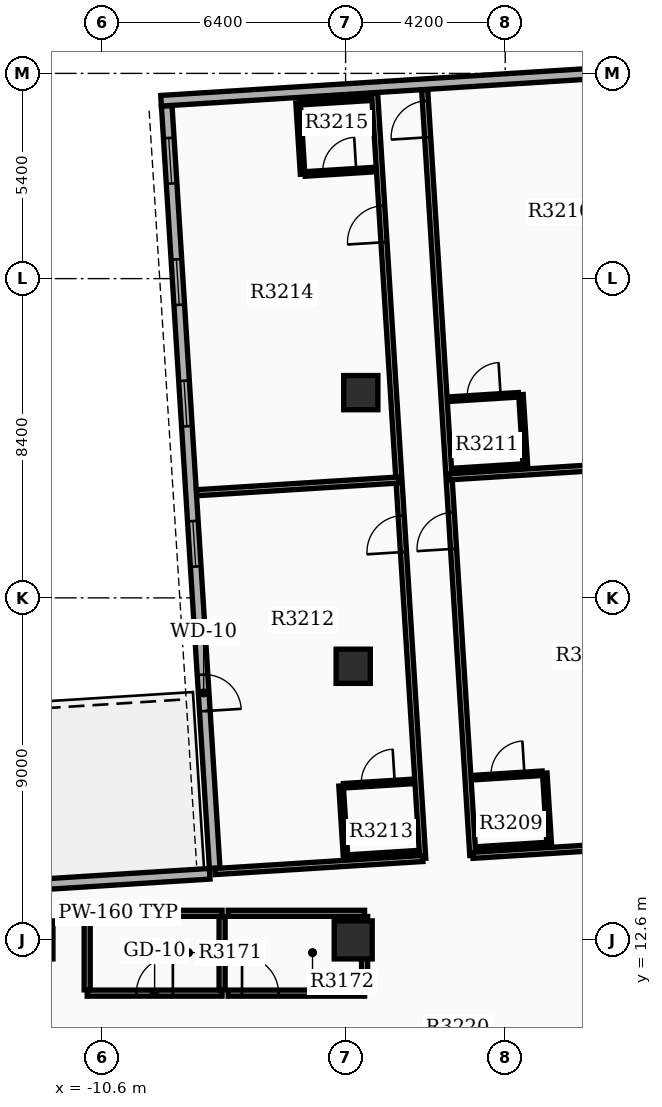
"""IFC4 building model, lengths in metres.
Left out: names, types, materials, properties, quantities, classifications, styles, units other than length and angle.
Written with IfcOpenShell. Run it as: python <this file> out.ifc"""

import sys

from ifc_helpers import new_model, si_unit, direction, frame, frame_2d, origin, origin_2d, place, context, subcontext, project, spatial, rectangle, extrude, element, fill, save


model = new_model("IFC4")
c1 = context("Model", 3, precision=1e-05, world=origin(), true_north=direction((0.0, 1.0)))
c2 = subcontext(c1, "Body", "Model", "MODEL_VIEW")
j1 = project(units=[si_unit("LENGTHUNIT", "METRE"), si_unit("PLANEANGLEUNIT", "RADIAN")], contexts=[c1])
p1 = place(None, origin())
s1 = spatial("IfcSite", under=j1, at=p1, CompositionType="ELEMENT")
p2 = place(p1, origin())
s2 = spatial("IfcBuilding", under=s1, at=p2, CompositionType="ELEMENT")
p3 = place(p2, frame((0.0, 0.0, 201.3)))
s3 = spatial("IfcBuildingStorey", under=s2, at=p3, CompositionType="ELEMENT", Elevation=201.3)
for number, where, z_axis, x_axis in (
    (1, (-12.4, 12.6, 0.0), (0.0, 0.0, 1.0), (1.0, 0.0, 0.0)),
    (2, (-4.0, 12.6, 0.0), (0.0, 0.0, 1.0), (1.0, 0.0, 0.0)),
):
    element("IfcColumn", number, at=place(p3, frame(where, z_axis=z_axis, x_axis=x_axis)), inside=s3, PredefinedType="COLUMN", context=c2, shape_type="SweptSolid", body=[
        extrude(rectangle(XDim=1.0, YDim=1.0, at=origin_2d()), origin(), (0.0, 0.0, 1.0), 3.9),
    ])
for number, where, z_axis, x_axis in (
    (3, (-4.0, 19.8, 0.0), (0.0, 0.0, 1.0), (1.0, 0.0, 0.0)),
    (4, (-3.8, 27.0, 0.0), (0.0, 0.0, 1.0), (1.0, 0.0, 0.0)),
):
    element("IfcColumn", number, at=place(p3, frame(where, z_axis=z_axis, x_axis=x_axis)), inside=s3, PredefinedType="COLUMN", context=c2, shape_type="SweptSolid", body=[
        extrude(rectangle(XDim=0.9, YDim=0.9, at=origin_2d()), origin(), (0.0, 0.0, 1.0), 3.9),
    ])
p4 = place(p3, frame((-8.907, 34.549, 0.0), z_axis=(0.0, 0.0, 1.0), x_axis=(0.06279645424, -0.99802635503, 0.0)))
e5 = element("IfcWall", 5, at=p4, inside=s3, PredefinedType="STANDARD", context=c2, shape_type="SweptSolid", body=[
    extrude(rectangle(XDim=20.1, YDim=0.28, at=frame_2d((10.05, 0.0))), origin(), (0.0, 0.0, 1.0), 3.18),
])
p5 = place(p4, frame((0.85, 0.0, 0.8)))
e6 = element("IfcOpeningElement", 6, at=p5, cuts=e5, PredefinedType="OPENING", context=c2, shape_type="SweptSolid", body=[
    extrude(rectangle(XDim=1.2, YDim=1.6, at=frame_2d((0.6, 0.8))), frame((0.0, 0.15, 0.0), z_axis=(0.0, -1.0, 0.0), x_axis=(1.0, 0.0, 0.0)), (0.0, 0.0, 1.0), 0.3),
])
p6 = place(p4, frame((4.05, 0.0, 0.8)))
e7 = element("IfcOpeningElement", 7, at=p6, cuts=e5, PredefinedType="OPENING", context=c2, shape_type="SweptSolid", body=[
    extrude(rectangle(XDim=1.2, YDim=1.6, at=frame_2d((0.6, 0.8))), frame((0.0, 0.15, 0.0), z_axis=(0.0, -1.0, 0.0), x_axis=(1.0, 0.0, 0.0)), (0.0, 0.0, 1.0), 0.3),
])
p7 = place(p4, frame((7.25, 0.0, 0.8)))
e8 = element("IfcOpeningElement", 8, at=p7, cuts=e5, PredefinedType="OPENING", context=c2, shape_type="SweptSolid", body=[
    extrude(rectangle(XDim=1.2, YDim=1.6, at=frame_2d((0.6, 0.8))), frame((0.0, 0.15, 0.0), z_axis=(0.0, -1.0, 0.0), x_axis=(1.0, 0.0, 0.0)), (0.0, 0.0, 1.0), 0.3),
])
p8 = place(p4, frame((10.95, 0.0, 0.8)))
e9 = element("IfcOpeningElement", 9, at=p8, cuts=e5, PredefinedType="OPENING", context=c2, shape_type="SweptSolid", body=[
    extrude(rectangle(XDim=1.2, YDim=1.6, at=frame_2d((0.6, 0.8))), frame((0.0, 0.15, 0.0), z_axis=(0.0, -1.0, 0.0), x_axis=(1.0, 0.0, 0.0)), (0.0, 0.0, 1.0), 0.3),
])
p9 = place(p4, frame((15.0, 0.0, 0.0)))
e10 = element("IfcOpeningElement", 10, at=p9, cuts=e5, PredefinedType="OPENING", context=c2, shape_type="SweptSolid", body=[
    extrude(rectangle(XDim=0.96, YDim=2.1, at=frame_2d((0.48, 1.05))), frame((0.0, 0.15, 0.0), z_axis=(0.0, -1.0, 0.0), x_axis=(1.0, 0.0, 0.0)), (0.0, 0.0, 1.0), 0.3),
])
p10 = place(p3, frame((4.637, 35.541, 0.0), z_axis=(0.0, 0.0, 1.0), x_axis=(-0.998026318072, -0.062797041623, 0.0)))
e11 = element("IfcWall", 11, at=p10, inside=s3, PredefinedType="STANDARD", context=c2, shape_type="SweptSolid", body=[
    extrude(rectangle(XDim=13.72, YDim=0.28, at=frame_2d((6.86, 0.0))), origin(), (0.0, 0.0, 1.0), 3.18),
])
p11 = place(p10, frame((0.85, 0.0, 0.85)))
e12 = element("IfcOpeningElement", 12, at=p11, cuts=e11, PredefinedType="OPENING", context=c2, shape_type="SweptSolid", body=[
    extrude(rectangle(XDim=1.0, YDim=1.5, at=frame_2d((0.5, 0.75))), frame((0.0, 0.15, 0.0), z_axis=(0.0, -1.0, 0.0), x_axis=(1.0, 0.0, 0.0)), (0.0, 0.0, 1.0), 0.3),
])
p12 = place(p3, frame((-14.063, 13.945, 0.0), z_axis=(0.0, 0.0, 1.0), x_axis=(0.998027314704, 0.062781200242, 0.0)))
e13 = element("IfcWall", 13, at=p12, inside=s3, PredefinedType="STANDARD", context=c2, shape_type="SweptSolid", body=[
    extrude(rectangle(XDim=6.3, YDim=0.28, at=frame_2d((3.15, 0.0))), origin(), (0.0, 0.0, 1.0), 3.18),
])
p13 = place(p3, frame((-11.0, 11.2, 0.0), z_axis=(0.0, 0.0, 1.0), x_axis=(1.0, 0.0, 0.0)))
e14 = element("IfcWall", 14, at=p13, inside=s3, PredefinedType="PARTITIONING", context=c2, shape_type="SweptSolid", body=[
    extrude(rectangle(XDim=3.55, YDim=0.16, at=frame_2d((1.775, 0.0))), origin(), (0.0, 0.0, 1.0), 3.17),
])
p14 = place(p13, frame((1.295, 0.0, 0.0)))
e15 = element("IfcOpeningElement", 15, at=p14, cuts=e14, PredefinedType="OPENING", context=c2, shape_type="SweptSolid", body=[
    extrude(rectangle(XDim=0.96, YDim=2.15, at=frame_2d((0.48, 1.075))), frame((0.0, 0.09, 0.0), z_axis=(0.0, -1.0, 0.0), x_axis=(1.0, 0.0, 0.0)), (0.0, 0.0, 1.0), 0.18),
])
p15 = place(p3, frame((-11.0, 13.3, 0.0), z_axis=(0.0, 0.0, 1.0), x_axis=(1.0, 0.0, 0.0)))
e16 = element("IfcWall", 16, at=p15, inside=s3, PredefinedType="PARTITIONING", context=c2, shape_type="SweptSolid", body=[
    extrude(rectangle(XDim=3.55, YDim=0.16, at=frame_2d((1.775, 0.0))), origin(), (0.0, 0.0, 1.0), 3.17),
])
for number, where, z_axis, x_axis in (
    (17, (-11.0, 11.285, 0.0), (0.0, 0.0, 1.0), (0.0, 1.0, 0.0)),
    (18, (-7.45, 11.285, 0.0), (0.0, 0.0, 1.0), (0.0, 1.0, 0.0)),
):
    element("IfcWall", number, at=place(p3, frame(where, z_axis=z_axis, x_axis=x_axis)), inside=s3, PredefinedType="PARTITIONING", context=c2, shape_type="SweptSolid", body=[
        extrude(rectangle(XDim=1.93, YDim=0.16, at=frame_2d((0.965, 0.0))), origin(), (0.0, 0.0, 1.0), 3.17),
    ])
p16 = place(p3, frame((-7.29, 11.2, 0.0), z_axis=(0.0, 0.0, 1.0), x_axis=(1.0, 0.0, 0.0)))
e19 = element("IfcWall", 19, at=p16, inside=s3, PredefinedType="PARTITIONING", context=c2, shape_type="SweptSolid", body=[
    extrude(rectangle(XDim=3.59, YDim=0.16, at=frame_2d((1.795, 0.0))), origin(), (0.0, 0.0, 1.0), 3.17),
])
p17 = place(p16, frame((0.365, 0.0, 0.0)))
e20 = element("IfcOpeningElement", 20, at=p17, cuts=e19, PredefinedType="OPENING", context=c2, shape_type="SweptSolid", body=[
    extrude(rectangle(XDim=0.96, YDim=2.15, at=frame_2d((0.48, 1.075))), frame((0.0, 0.09, 0.0), z_axis=(0.0, -1.0, 0.0), x_axis=(1.0, 0.0, 0.0)), (0.0, 0.0, 1.0), 0.18),
])
p18 = place(p3, frame((-7.29, 13.3, 0.0), z_axis=(0.0, 0.0, 1.0), x_axis=(1.0, 0.0, 0.0)))
e21 = element("IfcWall", 21, at=p18, inside=s3, PredefinedType="PARTITIONING", context=c2, shape_type="SweptSolid", body=[
    extrude(rectangle(XDim=3.59, YDim=0.16, at=frame_2d((1.795, 0.0))), origin(), (0.0, 0.0, 1.0), 3.17),
])
p19 = place(p3, frame((-3.7, 11.285, 0.0), z_axis=(0.0, 0.0, 1.0), x_axis=(0.0, 1.0, 0.0)))
e22 = element("IfcWall", 22, at=p19, inside=s3, PredefinedType="PARTITIONING", context=c2, shape_type="SweptSolid", body=[
    extrude(rectangle(XDim=1.93, YDim=0.16, at=frame_2d((0.965, 0.0))), origin(), (0.0, 0.0, 1.0), 3.17),
])
p20 = place(p3, frame((-0.853, 14.826, 0.0), z_axis=(0.0, 0.0, 1.0), x_axis=(-0.062794751284, 0.99802646218, 0.0)))
e23 = element("IfcWall", 23, at=p20, inside=s3, PredefinedType="PARTITIONING", context=c2, shape_type="SweptSolid", body=[
    extrude(rectangle(XDim=20.182, YDim=0.16, at=frame_2d((10.091, 0.0))), origin(), (0.0, 0.0, 1.0), 3.17),
])
p21 = place(p20, frame((8.08, 0.0, 0.0)))
e24 = element("IfcOpeningElement", 24, at=p21, cuts=e23, PredefinedType="OPENING", context=c2, shape_type="SweptSolid", body=[
    extrude(rectangle(XDim=0.96, YDim=2.15, at=frame_2d((0.48, 1.075))), frame((0.0, 0.09, 0.0), z_axis=(0.0, -1.0, 0.0), x_axis=(1.0, 0.0, 0.0)), (0.0, 0.0, 1.0), 0.18),
])
p22 = place(p20, frame((18.93, 0.0, 0.0)))
e25 = element("IfcOpeningElement", 25, at=p22, cuts=e23, PredefinedType="OPENING", context=c2, shape_type="SweptSolid", body=[
    extrude(rectangle(XDim=0.96, YDim=2.15, at=frame_2d((0.48, 1.075))), frame((0.0, 0.09, 0.0), z_axis=(0.0, -1.0, 0.0), x_axis=(1.0, 0.0, 0.0)), (0.0, 0.0, 1.0), 0.18),
])
p23 = place(p3, frame((-0.853, 14.826, 0.0), z_axis=(0.0, 0.0, 1.0), x_axis=(0.998026165557, 0.062799465472, 0.0)))
e26 = element("IfcWall", 26, at=p23, inside=s3, PredefinedType="PARTITIONING", context=c2, shape_type="SweptSolid", body=[
    extrude(rectangle(XDim=6.64, YDim=0.16, at=frame_2d((3.32, 0.0))), origin(), (0.0, 0.0, 1.0), 3.17),
])
p24 = place(p3, frame((-1.479, 24.784, 0.0), z_axis=(0.0, 0.0, 1.0), x_axis=(0.998025855021, 0.062804400403, 0.0)))
e27 = element("IfcWall", 27, at=p24, inside=s3, PredefinedType="PARTITIONING", context=c2, shape_type="SweptSolid", body=[
    extrude(rectangle(XDim=6.492, YDim=0.16, at=frame_2d((3.246, 0.0))), origin(), (0.0, 0.0, 1.0), 3.17),
])
p25 = place(p3, frame((-0.841, 16.871, 0.0), z_axis=(0.0, 0.0, 1.0), x_axis=(0.998027443946, 0.062779145668, 0.0)))
e28 = element("IfcWall", 28, at=p25, inside=s3, PredefinedType="PARTITIONING", context=c2, shape_type="SweptSolid", body=[
    extrude(rectangle(XDim=1.82, YDim=0.12, at=frame_2d((0.91, 0.0))), origin(), (0.0, 0.0, 1.0), 3.17),
])
p26 = place(p25, frame((0.47, 0.0, 0.0)))
e29 = element("IfcOpeningElement", 29, at=p26, cuts=e28, PredefinedType="OPENING", context=c2, shape_type="SweptSolid", body=[
    extrude(rectangle(XDim=0.88, YDim=2.1, at=frame_2d((0.44, 1.05))), frame((0.0, 0.07, 0.0), z_axis=(0.0, -1.0, 0.0), x_axis=(1.0, 0.0, 0.0)), (0.0, 0.0, 1.0), 0.14),
])
p27 = place(p3, frame((-0.723, 14.994, 0.0), z_axis=(0.0, 0.0, 1.0), x_axis=(0.998027443946, 0.062779145668, 0.0)))
e30 = element("IfcWall", 30, at=p27, inside=s3, PredefinedType="PARTITIONING", context=c2, shape_type="SweptSolid", body=[
    extrude(rectangle(XDim=1.82, YDim=0.12, at=frame_2d((0.91, 0.0))), origin(), (0.0, 0.0, 1.0), 3.17),
])
p28 = place(p3, frame((1.158, 15.113, 0.0), z_axis=(0.0, 0.0, 1.0), x_axis=(-0.062855297722, 0.998022650819, 0.0)))
e31 = element("IfcWall", 31, at=p28, inside=s3, PredefinedType="PARTITIONING", context=c2, shape_type="SweptSolid", body=[
    extrude(rectangle(XDim=1.88, YDim=0.12, at=frame_2d((0.94, 0.0))), origin(), (0.0, 0.0, 1.0), 3.17),
])
p29 = place(p3, frame((-1.468, 26.829, 0.0), z_axis=(0.0, 0.0, 1.0), x_axis=(0.998027443946, 0.062779145668, 0.0)))
e32 = element("IfcWall", 32, at=p29, inside=s3, PredefinedType="PARTITIONING", context=c2, shape_type="SweptSolid", body=[
    extrude(rectangle(XDim=1.82, YDim=0.12, at=frame_2d((0.91, 0.0))), origin(), (0.0, 0.0, 1.0), 3.17),
])
p30 = place(p29, frame((0.47, 0.0, 0.0)))
e33 = element("IfcOpeningElement", 33, at=p30, cuts=e32, PredefinedType="OPENING", context=c2, shape_type="SweptSolid", body=[
    extrude(rectangle(XDim=0.88, YDim=2.1, at=frame_2d((0.44, 1.05))), frame((0.0, 0.07, 0.0), z_axis=(0.0, -1.0, 0.0), x_axis=(1.0, 0.0, 0.0)), (0.0, 0.0, 1.0), 0.14),
])
p31 = place(p3, frame((-1.349, 24.952, 0.0), z_axis=(0.0, 0.0, 1.0), x_axis=(0.998019030272, 0.062912758763, 0.0)))
e34 = element("IfcWall", 34, at=p31, inside=s3, PredefinedType="PARTITIONING", context=c2, shape_type="SweptSolid", body=[
    extrude(rectangle(XDim=1.82, YDim=0.12, at=frame_2d((0.91, 0.0))), origin(), (0.0, 0.0, 1.0), 3.17),
])
p32 = place(p3, frame((0.532, 25.071, 0.0), z_axis=(0.0, 0.0, 1.0), x_axis=(-0.062717813936, 0.998031300018, 0.0)))
e35 = element("IfcWall", 35, at=p32, inside=s3, PredefinedType="PARTITIONING", context=c2, shape_type="SweptSolid", body=[
    extrude(rectangle(XDim=1.88, YDim=0.12, at=frame_2d((0.94, 0.0))), origin(), (0.0, 0.0, 1.0), 3.17),
])
p33 = place(p3, frame((-2.17, 14.743, 0.0), z_axis=(0.0, 0.0, 1.0), x_axis=(-0.062795509413, 0.998026414479, 0.0)))
e36 = element("IfcWall", 36, at=p33, inside=s3, PredefinedType="PARTITIONING", context=c2, shape_type="SweptSolid", body=[
    extrude(rectangle(XDim=20.182, YDim=0.16, at=frame_2d((10.091, 0.0))), origin(), (0.0, 0.0, 1.0), 3.17),
])
p34 = place(p33, frame((8.08, 0.0, 0.0)))
e37 = element("IfcOpeningElement", 37, at=p34, cuts=e36, PredefinedType="OPENING", context=c2, shape_type="SweptSolid", body=[
    extrude(rectangle(XDim=0.96, YDim=2.15, at=frame_2d((0.48, 1.075))), frame((0.0, 0.09, 0.0), z_axis=(0.0, -1.0, 0.0), x_axis=(1.0, 0.0, 0.0)), (0.0, 0.0, 1.0), 0.18),
])
p35 = place(p33, frame((16.247, 0.0, 0.0)))
e38 = element("IfcOpeningElement", 38, at=p35, cuts=e36, PredefinedType="OPENING", context=c2, shape_type="SweptSolid", body=[
    extrude(rectangle(XDim=0.96, YDim=2.15, at=frame_2d((0.48, 1.075))), frame((0.0, 0.09, 0.0), z_axis=(0.0, -1.0, 0.0), x_axis=(1.0, 0.0, 0.0)), (0.0, 0.0, 1.0), 0.18),
])
p36 = place(p3, frame((-2.17, 14.743, 0.0), z_axis=(0.0, 0.0, 1.0), x_axis=(-0.998025093119, -0.06281650662, 0.0)))
e39 = element("IfcWall", 39, at=p36, inside=s3, PredefinedType="PARTITIONING", context=c2, shape_type="SweptSolid", body=[
    extrude(rectangle(XDim=5.48, YDim=0.16, at=frame_2d((2.74, 0.0))), origin(), (0.0, 0.0, 1.0), 3.17),
])
p37 = place(p3, frame((-2.796, 24.701, 0.0), z_axis=(0.0, 0.0, 1.0), x_axis=(-0.998027735445, -0.062774511414, 0.0)))
e40 = element("IfcWall", 40, at=p37, inside=s3, PredefinedType="PARTITIONING", context=c2, shape_type="SweptSolid", body=[
    extrude(rectangle(XDim=5.332, YDim=0.16, at=frame_2d((2.666, 0.0))), origin(), (0.0, 0.0, 1.0), 3.17),
])
p38 = place(p3, frame((-4.254, 16.656, 0.0), z_axis=(0.0, 0.0, 1.0), x_axis=(0.998027443946, 0.062779145668, 0.0)))
e41 = element("IfcWall", 41, at=p38, inside=s3, PredefinedType="PARTITIONING", context=c2, shape_type="SweptSolid", body=[
    extrude(rectangle(XDim=1.82, YDim=0.12, at=frame_2d((0.91, 0.0))), origin(), (0.0, 0.0, 1.0), 3.17),
])
p39 = place(p38, frame((0.47, 0.0, 0.0)))
e42 = element("IfcOpeningElement", 42, at=p39, cuts=e41, PredefinedType="OPENING", context=c2, shape_type="SweptSolid", body=[
    extrude(rectangle(XDim=0.88, YDim=2.1, at=frame_2d((0.44, 1.05))), frame((0.0, 0.07, 0.0), z_axis=(0.0, -1.0, 0.0), x_axis=(1.0, 0.0, 0.0)), (0.0, 0.0, 1.0), 0.14),
])
p40 = place(p3, frame((-4.136, 14.78, 0.0), z_axis=(0.0, 0.0, 1.0), x_axis=(0.998027443946, 0.062779145668, 0.0)))
e43 = element("IfcWall", 43, at=p40, inside=s3, PredefinedType="PARTITIONING", context=c2, shape_type="SweptSolid", body=[
    extrude(rectangle(XDim=1.82, YDim=0.12, at=frame_2d((0.91, 0.0))), origin(), (0.0, 0.0, 1.0), 3.17),
])
p41 = place(p3, frame((-4.201, 14.775, 0.0), z_axis=(0.0, 0.0, 1.0), x_axis=(-0.062855297722, 0.998022650819, 0.0)))
e44 = element("IfcWall", 44, at=p41, inside=s3, PredefinedType="PARTITIONING", context=c2, shape_type="SweptSolid", body=[
    extrude(rectangle(XDim=1.88, YDim=0.12, at=frame_2d((0.94, 0.0))), origin(), (0.0, 0.0, 1.0), 3.17),
])
p42 = place(p3, frame((-5.267, 32.754, 0.0), z_axis=(0.0, 0.0, 1.0), x_axis=(0.998027443946, 0.062779145668, 0.0)))
e45 = element("IfcWall", 45, at=p42, inside=s3, PredefinedType="PARTITIONING", context=c2, shape_type="SweptSolid", body=[
    extrude(rectangle(XDim=1.82, YDim=0.12, at=frame_2d((0.91, 0.0))), origin(), (0.0, 0.0, 1.0), 3.17),
])
p43 = place(p42, frame((0.47, 0.0, 0.0)))
e46 = element("IfcOpeningElement", 46, at=p43, cuts=e45, PredefinedType="OPENING", context=c2, shape_type="SweptSolid", body=[
    extrude(rectangle(XDim=0.88, YDim=2.1, at=frame_2d((0.44, 1.05))), frame((0.0, 0.07, 0.0), z_axis=(0.0, -1.0, 0.0), x_axis=(1.0, 0.0, 0.0)), (0.0, 0.0, 1.0), 0.14),
])
p44 = place(p3, frame((-5.385, 34.63, 0.0), z_axis=(0.0, 0.0, 1.0), x_axis=(0.998027443946, 0.062779145668, 0.0)))
e47 = element("IfcWall", 47, at=p44, inside=s3, PredefinedType="PARTITIONING", context=c2, shape_type="SweptSolid", body=[
    extrude(rectangle(XDim=1.82, YDim=0.12, at=frame_2d((0.91, 0.0))), origin(), (0.0, 0.0, 1.0), 3.17),
])
p45 = place(p3, frame((-5.332, 32.75, 0.0), z_axis=(0.0, 0.0, 1.0), x_axis=(-0.062847152131, 0.998023163794, 0.0)))
e48 = element("IfcWall", 48, at=p45, inside=s3, PredefinedType="PARTITIONING", context=c2, shape_type="SweptSolid", body=[
    extrude(rectangle(XDim=1.88, YDim=0.12, at=frame_2d((0.94, 0.0))), origin(), (0.0, 0.0, 1.0), 3.17),
])
p46 = place(p5, origin())
e49 = element("IfcWindow", 49, at=p46, inside=s3, PartitioningType="SINGLE_PANEL", PredefinedType="WINDOW", context=c2, shape_type="SweptSolid", body=[
    extrude(rectangle(XDim=1.2, YDim=1.6, at=frame_2d((0.6, 0.8))), frame((0.0, 0.03, 0.0), z_axis=(0.0, -1.0, 0.0), x_axis=(1.0, 0.0, 0.0)), (0.0, 0.0, 1.0), 0.06),
])
fill(e6, e49)
p47 = place(p6, origin())
e50 = element("IfcWindow", 50, at=p47, inside=s3, PartitioningType="SINGLE_PANEL", PredefinedType="WINDOW", context=c2, shape_type="SweptSolid", body=[
    extrude(rectangle(XDim=1.2, YDim=1.6, at=frame_2d((0.6, 0.8))), frame((0.0, 0.03, 0.0), z_axis=(0.0, -1.0, 0.0), x_axis=(1.0, 0.0, 0.0)), (0.0, 0.0, 1.0), 0.06),
])
fill(e7, e50)
p48 = place(p7, origin())
e51 = element("IfcWindow", 51, at=p48, inside=s3, PartitioningType="SINGLE_PANEL", PredefinedType="WINDOW", context=c2, shape_type="SweptSolid", body=[
    extrude(rectangle(XDim=1.2, YDim=1.6, at=frame_2d((0.6, 0.8))), frame((0.0, 0.03, 0.0), z_axis=(0.0, -1.0, 0.0), x_axis=(1.0, 0.0, 0.0)), (0.0, 0.0, 1.0), 0.06),
])
fill(e8, e51)
p49 = place(p8, origin())
e52 = element("IfcWindow", 52, at=p49, inside=s3, PartitioningType="SINGLE_PANEL", PredefinedType="WINDOW", context=c2, shape_type="SweptSolid", body=[
    extrude(rectangle(XDim=1.2, YDim=1.6, at=frame_2d((0.6, 0.8))), frame((0.0, 0.03, 0.0), z_axis=(0.0, -1.0, 0.0), x_axis=(1.0, 0.0, 0.0)), (0.0, 0.0, 1.0), 0.06),
])
fill(e9, e52)
p50 = place(p9, origin())
e53 = element("IfcDoor", 53, at=p50, inside=s3, OperationType="SINGLE_SWING_RIGHT", PredefinedType="DOOR", context=c2, shape_type="SweptSolid", body=[
    extrude(rectangle(XDim=0.96, YDim=2.1, at=frame_2d((0.48, 1.05))), frame((0.0, 0.025, 0.0), z_axis=(0.0, -1.0, 0.0), x_axis=(1.0, 0.0, 0.0)), (0.0, 0.0, 1.0), 0.05),
])
fill(e10, e53)
p51 = place(p14, origin())
e54 = element("IfcDoor", 54, at=p51, inside=s3, OperationType="SINGLE_SWING_RIGHT", PredefinedType="DOOR", context=c2, shape_type="SweptSolid", body=[
    extrude(rectangle(XDim=0.96, YDim=2.15, at=frame_2d((0.48, 1.075))), frame((0.0, 0.025, 0.0), z_axis=(0.0, -1.0, 0.0), x_axis=(1.0, 0.0, 0.0)), (0.0, 0.0, 1.0), 0.05),
])
fill(e15, e54)
p52 = place(p17, origin())
e55 = element("IfcDoor", 55, at=p52, inside=s3, OperationType="SINGLE_SWING_LEFT", PredefinedType="DOOR", context=c2, shape_type="SweptSolid", body=[
    extrude(rectangle(XDim=0.96, YDim=2.15, at=frame_2d((0.48, 1.075))), frame((0.0, 0.025, 0.0), z_axis=(0.0, -1.0, 0.0), x_axis=(1.0, 0.0, 0.0)), (0.0, 0.0, 1.0), 0.05),
])
fill(e20, e55)
p53 = place(p21, origin())
e56 = element("IfcDoor", 56, at=p53, inside=s3, OperationType="SINGLE_SWING_LEFT", PredefinedType="DOOR", context=c2, shape_type="SweptSolid", body=[
    extrude(rectangle(XDim=0.96, YDim=2.15, at=frame_2d((0.48, 1.075))), frame((0.0, 0.025, 0.0), z_axis=(0.0, -1.0, 0.0), x_axis=(1.0, 0.0, 0.0)), (0.0, 0.0, 1.0), 0.05),
])
fill(e24, e56)
p54 = place(p26, origin())
e57 = element("IfcDoor", 57, at=p54, inside=s3, OperationType="SINGLE_SWING_RIGHT", PredefinedType="DOOR", context=c2, shape_type="SweptSolid", body=[
    extrude(rectangle(XDim=0.88, YDim=2.1, at=frame_2d((0.44, 1.05))), frame((0.0, 0.025, 0.0), z_axis=(0.0, -1.0, 0.0), x_axis=(1.0, 0.0, 0.0)), (0.0, 0.0, 1.0), 0.05),
])
fill(e29, e57)
p55 = place(p22, origin())
e58 = element("IfcDoor", 58, at=p55, inside=s3, OperationType="SINGLE_SWING_LEFT", PredefinedType="DOOR", context=c2, shape_type="SweptSolid", body=[
    extrude(rectangle(XDim=0.96, YDim=2.15, at=frame_2d((0.48, 1.075))), frame((0.0, 0.025, 0.0), z_axis=(0.0, -1.0, 0.0), x_axis=(1.0, 0.0, 0.0)), (0.0, 0.0, 1.0), 0.05),
])
fill(e25, e58)
p56 = place(p30, origin())
e59 = element("IfcDoor", 59, at=p56, inside=s3, OperationType="SINGLE_SWING_RIGHT", PredefinedType="DOOR", context=c2, shape_type="SweptSolid", body=[
    extrude(rectangle(XDim=0.88, YDim=2.1, at=frame_2d((0.44, 1.05))), frame((0.0, 0.025, 0.0), z_axis=(0.0, -1.0, 0.0), x_axis=(1.0, 0.0, 0.0)), (0.0, 0.0, 1.0), 0.05),
])
fill(e33, e59)
p57 = place(p34, origin())
e60 = element("IfcDoor", 60, at=p57, inside=s3, OperationType="SINGLE_SWING_LEFT", PredefinedType="DOOR", context=c2, shape_type="SweptSolid", body=[
    extrude(rectangle(XDim=0.96, YDim=2.15, at=frame_2d((0.48, 1.075))), frame((0.0, 0.025, 0.0), z_axis=(0.0, -1.0, 0.0), x_axis=(1.0, 0.0, 0.0)), (0.0, 0.0, 1.0), 0.05),
])
fill(e37, e60)
p58 = place(p39, origin())
e61 = element("IfcDoor", 61, at=p58, inside=s3, OperationType="SINGLE_SWING_RIGHT", PredefinedType="DOOR", context=c2, shape_type="SweptSolid", body=[
    extrude(rectangle(XDim=0.88, YDim=2.1, at=frame_2d((0.44, 1.05))), frame((0.0, 0.025, 0.0), z_axis=(0.0, -1.0, 0.0), x_axis=(1.0, 0.0, 0.0)), (0.0, 0.0, 1.0), 0.05),
])
fill(e42, e61)
p59 = place(p35, origin())
e62 = element("IfcDoor", 62, at=p59, inside=s3, OperationType="SINGLE_SWING_LEFT", PredefinedType="DOOR", context=c2, shape_type="SweptSolid", body=[
    extrude(rectangle(XDim=0.96, YDim=2.15, at=frame_2d((0.48, 1.075))), frame((0.0, 0.025, 0.0), z_axis=(0.0, -1.0, 0.0), x_axis=(1.0, 0.0, 0.0)), (0.0, 0.0, 1.0), 0.05),
])
fill(e38, e62)
p60 = place(p43, origin())
e63 = element("IfcDoor", 63, at=p60, inside=s3, OperationType="SINGLE_SWING_RIGHT", PredefinedType="DOOR", context=c2, shape_type="SweptSolid", body=[
    extrude(rectangle(XDim=0.88, YDim=2.1, at=frame_2d((0.44, 1.05))), frame((0.0, 0.025, 0.0), z_axis=(0.0, -1.0, 0.0), x_axis=(1.0, 0.0, 0.0)), (0.0, 0.0, 1.0), 0.05),
])
fill(e46, e63)
save(model, sys.argv[1])
